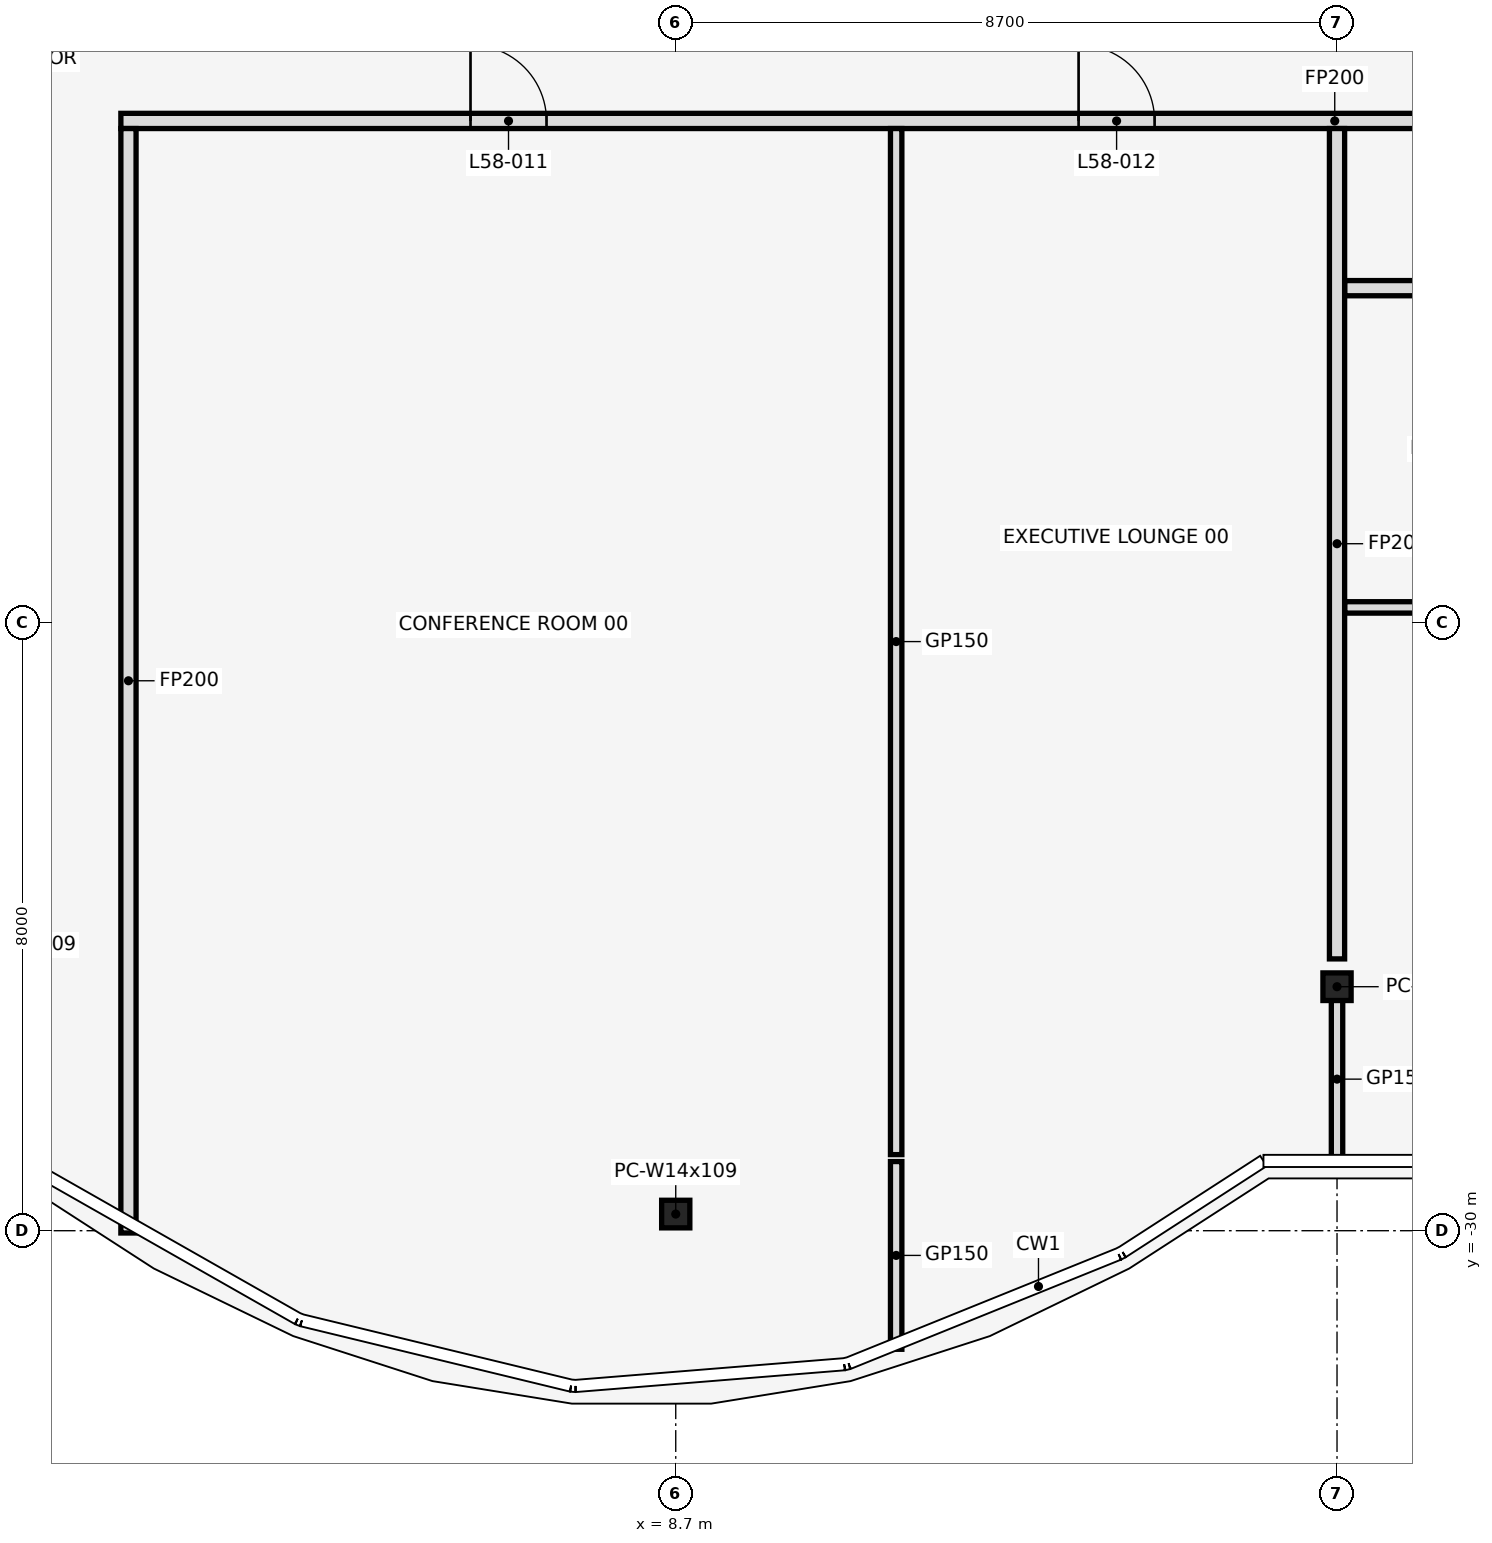
"""IFC4 building model, lengths in metres.
Left out: names, types, materials, properties, quantities, classifications, styles, units other than length and angle.
Written with IfcOpenShell. Run it as: python <this file> out.ifc"""

import sys

from ifc_helpers import new_model, si_unit, direction, frame, frame_2d, origin, origin_2d, place, context, subcontext, project, spatial, rectangle, i_section, extrude, element, fill, save


model = new_model("IFC4")
c1 = context("Model", 3, precision=1e-05, world=origin(), true_north=direction((0.0, 1.0)))
c2 = subcontext(c1, "Body", "Model", "MODEL_VIEW")
j1 = project(units=[si_unit("LENGTHUNIT", "METRE"), si_unit("PLANEANGLEUNIT", "RADIAN")], contexts=[c1])
p1 = place(None, origin())
s1 = spatial("IfcSite", under=j1, at=p1, CompositionType="ELEMENT")
p2 = place(p1, origin())
s2 = spatial("IfcBuilding", under=s1, at=p2, CompositionType="ELEMENT")
p3 = place(p2, frame((0.0, 0.0, 258.2)))
s3 = spatial("IfcBuildingStorey", under=s2, at=p3, CompositionType="ELEMENT", Elevation=258.2)
for number, where, z_axis, x_axis in (
    (1, (8.7, -29.781, 0.0), (0.0, 0.0, 1.0), (1.0, 0.0, 0.0)),
    (2, (17.4, -26.79, 0.0), (0.0, 0.0, 1.0), (1.0, 0.0, 0.0)),
):
    element("IfcColumn", number, at=place(p3, frame(where, z_axis=z_axis, x_axis=x_axis)), inside=s3, PredefinedType="COLUMN", context=c2, shape_type="SweptSolid", body=[
        extrude(i_section(OverallWidth=0.371, OverallDepth=0.363, WebThickness=0.013, FlangeThickness=0.022, at=origin_2d()), origin(), (0.0, 0.0, 1.0), 4.2),
    ])
p4 = place(p3, frame((17.5, -21.8, 0.0), z_axis=(0.0, 0.0, 1.0), x_axis=(1.0, 0.0, 0.0)))
e3 = element("IfcWall", 3, at=p4, inside=s3, PredefinedType="PARTITIONING", context=c2, shape_type="SweptSolid", body=[
    extrude(rectangle(XDim=8.7, YDim=0.15, at=frame_2d((4.35, 0.0))), origin(), (0.0, 0.0, 1.0), 3.118),
])
p5 = place(p3, frame((17.5, -17.6, 0.0), z_axis=(0.0, 0.0, 1.0), x_axis=(1.0, 0.0, 0.0)))
e4 = element("IfcWall", 4, at=p5, inside=s3, PredefinedType="PARTITIONING", context=c2, shape_type="SweptSolid", body=[
    extrude(rectangle(XDim=8.5, YDim=0.2, at=frame_2d((4.25, 0.0))), origin(), (0.0, 0.0, 1.0), 3.118),
])
p6 = place(p5, frame((1.1, 0.0, 0.0)))
e5 = element("IfcOpeningElement", 5, at=p6, cuts=e4, PredefinedType="OPENING", context=c2, shape_type="SweptSolid", body=[
    extrude(rectangle(XDim=0.9, YDim=2.1, at=frame_2d((0.45, 1.05))), frame((0.0, 0.112, 0.0), z_axis=(0.0, -1.0, 0.0), x_axis=(1.0, 0.0, 0.0)), (0.0, 0.0, 1.0), 0.224),
])
p7 = place(p5, frame((4.3, 0.0, 0.0)))
e6 = element("IfcOpeningElement", 6, at=p7, cuts=e4, PredefinedType="OPENING", context=c2, shape_type="SweptSolid", body=[
    extrude(rectangle(XDim=0.9, YDim=2.1, at=frame_2d((0.45, 1.05))), frame((0.0, 0.112, 0.0), z_axis=(0.0, -1.0, 0.0), x_axis=(1.0, 0.0, 0.0)), (0.0, 0.0, 1.0), 0.224),
])
p8 = place(p5, frame((6.9, 0.0, 0.0)))
e7 = element("IfcOpeningElement", 7, at=p8, cuts=e4, PredefinedType="OPENING", context=c2, shape_type="SweptSolid", body=[
    extrude(rectangle(XDim=1.0, YDim=2.1, at=frame_2d((0.5, 1.05))), frame((0.0, 0.112, 0.0), z_axis=(0.0, -1.0, 0.0), x_axis=(1.0, 0.0, 0.0)), (0.0, 0.0, 1.0), 0.224),
])
p9 = place(p3, frame((1.4, -15.4, 0.0), z_axis=(0.0, 0.0, 1.0), x_axis=(1.0, 0.0, 0.0)))
e8 = element("IfcWall", 8, at=p9, inside=s3, PredefinedType="PARTITIONING", context=c2, shape_type="SweptSolid", body=[
    extrude(rectangle(XDim=31.94, YDim=0.2, at=frame_2d((15.97, 0.0))), origin(), (0.0, 0.0, 1.0), 3.118),
])
p10 = place(p9, frame((4.6, 0.0, 0.0)))
e9 = element("IfcOpeningElement", 9, at=p10, cuts=e8, PredefinedType="OPENING", context=c2, shape_type="SweptSolid", body=[
    extrude(rectangle(XDim=1.0, YDim=2.1, at=frame_2d((0.5, 1.05))), frame((0.0, 0.112, 0.0), z_axis=(0.0, -1.0, 0.0), x_axis=(1.0, 0.0, 0.0)), (0.0, 0.0, 1.0), 0.224),
])
p11 = place(p9, frame((12.6, 0.0, 0.0)))
e10 = element("IfcOpeningElement", 10, at=p11, cuts=e8, PredefinedType="OPENING", context=c2, shape_type="SweptSolid", body=[
    extrude(rectangle(XDim=1.0, YDim=2.1, at=frame_2d((0.5, 1.05))), frame((0.0, 0.112, 0.0), z_axis=(0.0, -1.0, 0.0), x_axis=(1.0, 0.0, 0.0)), (0.0, 0.0, 1.0), 0.224),
])
p12 = place(p9, frame((19.9, 0.0, 0.0)))
e11 = element("IfcOpeningElement", 11, at=p12, cuts=e8, PredefinedType="OPENING", context=c2, shape_type="SweptSolid", body=[
    extrude(rectangle(XDim=0.9, YDim=2.1, at=frame_2d((0.45, 1.05))), frame((0.0, 0.112, 0.0), z_axis=(0.0, -1.0, 0.0), x_axis=(1.0, 0.0, 0.0)), (0.0, 0.0, 1.0), 0.224),
])
p13 = place(p9, frame((27.8, 0.0, 0.0)))
e12 = element("IfcOpeningElement", 12, at=p13, cuts=e8, PredefinedType="OPENING", context=c2, shape_type="SweptSolid", body=[
    extrude(rectangle(XDim=1.0, YDim=2.1, at=frame_2d((0.5, 1.05))), frame((0.0, 0.112, 0.0), z_axis=(0.0, -1.0, 0.0), x_axis=(1.0, 0.0, 0.0)), (0.0, 0.0, 1.0), 0.224),
])
p14 = place(p3, frame((1.5, -30.03, 0.0), z_axis=(0.0, 0.0, 1.0), x_axis=(0.0, 1.0, 0.0)))
e13 = element("IfcWall", 13, at=p14, inside=s3, PredefinedType="PARTITIONING", context=c2, shape_type="SweptSolid", body=[
    extrude(rectangle(XDim=14.53, YDim=0.2, at=frame_2d((7.265, 0.0))), origin(), (0.0, 0.0, 1.0), 3.118),
])
p15 = place(p3, frame((11.6, -31.56, 0.0), z_axis=(0.0, 0.0, 1.0), x_axis=(0.0, 1.0, 0.0)))
e14 = element("IfcWall", 14, at=p15, inside=s3, PredefinedType="PARTITIONING", context=c2, shape_type="SweptSolid", body=[
    extrude(rectangle(XDim=2.47, YDim=0.15, at=frame_2d((1.235, 0.0))), origin(), (0.0, 0.0, 1.0), 3.118),
])
p16 = place(p3, frame((11.6, -28.999, 0.0), z_axis=(0.0, 0.0, 1.0), x_axis=(0.0, 1.0, 0.0)))
e15 = element("IfcWall", 15, at=p16, inside=s3, PredefinedType="PARTITIONING", context=c2, shape_type="SweptSolid", body=[
    extrude(rectangle(XDim=13.499, YDim=0.15, at=frame_2d((6.75, 0.0))), origin(), (0.0, 0.0, 1.0), 3.118),
])
p17 = place(p3, frame((17.4, -29.1, 0.0), z_axis=(0.0, 0.0, 1.0), x_axis=(0.0, 1.0, 0.0)))
e16 = element("IfcWall", 16, at=p17, inside=s3, PredefinedType="PARTITIONING", context=c2, shape_type="SweptSolid", body=[
    extrude(rectangle(XDim=2.188, YDim=0.15, at=frame_2d((1.094, 0.0))), origin(), (0.0, 0.0, 1.0), 3.118),
])
p18 = place(p3, frame((17.4, -26.424, 0.0), z_axis=(0.0, 0.0, 1.0), x_axis=(0.0, 1.0, 0.0)))
e17 = element("IfcWall", 17, at=p18, inside=s3, PredefinedType="PARTITIONING", context=c2, shape_type="SweptSolid", body=[
    extrude(rectangle(XDim=10.924, YDim=0.2, at=frame_2d((5.462, 0.0))), origin(), (0.0, 0.0, 1.0), 3.118),
])
p19 = place(p10, frame((1.0, 0.0, 0.0), z_axis=(0.0, 0.0, 1.0), x_axis=(-1.0, 0.0, 0.0)))
e18 = element("IfcDoor", 18, at=p19, inside=s3, OperationType="SINGLE_SWING_RIGHT", PredefinedType="DOOR", context=c2, shape_type="SweptSolid", body=[
    extrude(rectangle(XDim=1.0, YDim=2.1, at=frame_2d((0.5, 1.05))), frame((0.0, 0.025, 0.0), z_axis=(0.0, -1.0, 0.0), x_axis=(1.0, 0.0, 0.0)), (0.0, 0.0, 1.0), 0.05),
])
fill(e9, e18)
p20 = place(p11, frame((1.0, 0.0, 0.0), z_axis=(0.0, 0.0, 1.0), x_axis=(-1.0, 0.0, 0.0)))
e19 = element("IfcDoor", 19, at=p20, inside=s3, OperationType="SINGLE_SWING_RIGHT", PredefinedType="DOOR", context=c2, shape_type="SweptSolid", body=[
    extrude(rectangle(XDim=1.0, YDim=2.1, at=frame_2d((0.5, 1.05))), frame((0.0, 0.025, 0.0), z_axis=(0.0, -1.0, 0.0), x_axis=(1.0, 0.0, 0.0)), (0.0, 0.0, 1.0), 0.05),
])
fill(e10, e19)
save(model, sys.argv[1])
